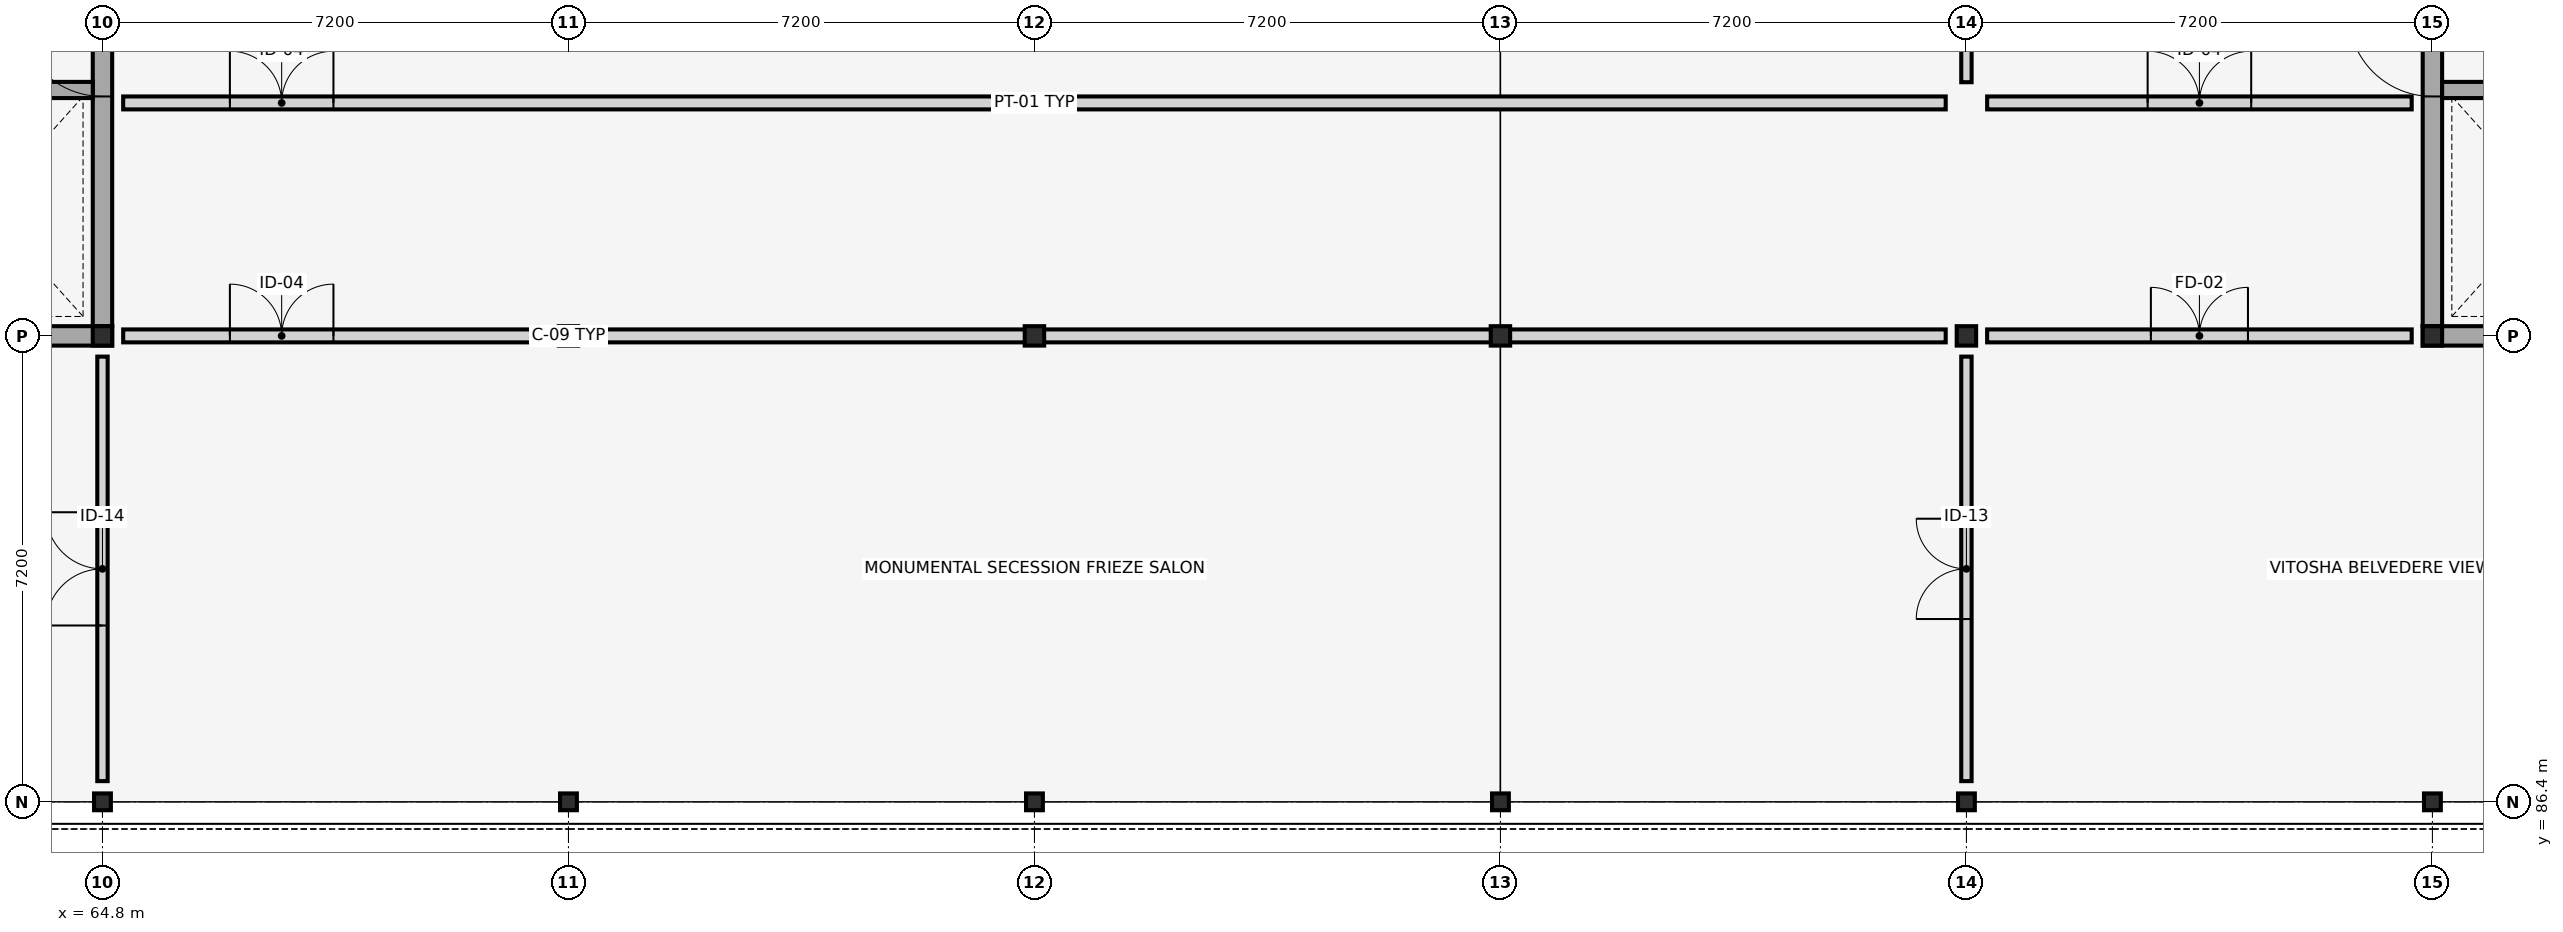
"""IFC4 building model, lengths in metres.
Left out: names, types, materials, properties, quantities, classifications, styles, units other than length and angle.
Written with IfcOpenShell. Run it as: python <this file> out.ifc"""

import sys

from ifc_helpers import new_model, si_unit, direction, frame, frame_2d, origin, origin_2d, place, context, subcontext, project, spatial, rectangle, i_section, extrude, element, fill, save


model = new_model("IFC4")
c1 = context("Model", 3, precision=1e-05, world=origin(), true_north=direction((0.0, 1.0)))
c2 = subcontext(c1, "Body", "Model", "MODEL_VIEW")
j1 = project(units=[si_unit("LENGTHUNIT", "METRE"), si_unit("PLANEANGLEUNIT", "RADIAN")], contexts=[c1])
p1 = place(None, origin())
s1 = spatial("IfcSite", under=j1, at=p1, CompositionType="ELEMENT")
p2 = place(p1, origin())
s2 = spatial("IfcBuilding", under=s1, at=p2, CompositionType="ELEMENT")
p3 = place(p2, frame((0.0, 0.0, 17.1)))
s3 = spatial("IfcBuildingStorey", under=s2, at=p3, CompositionType="ELEMENT", Elevation=17.1)
p4 = place(p3, frame((64.8, 86.4, 0.0), z_axis=(0.0, 0.0, 1.0), x_axis=(0.0, 1.0, 0.0)))
e1 = element("IfcColumn", 1, at=p4, inside=s3, PredefinedType="COLUMN", context=c2, shape_type="SweptSolid", body=[
    extrude(i_section(OverallWidth=0.26, OverallDepth=0.26, WebThickness=0.01, FlangeThickness=0.018, FilletRadius=0.024, at=origin_2d()), origin(), (0.0, 0.0, 1.0), 8.1),
])
p5 = place(p3, frame((64.8, 93.6, 0.0), z_axis=(0.0, 0.0, 1.0), x_axis=(1.0, 0.0, 0.0)))
e2 = element("IfcColumn", 2, at=p5, inside=s3, PredefinedType="COLUMN", context=c2, shape_type="SweptSolid", body=[
    extrude(i_section(OverallWidth=0.3, OverallDepth=0.3, WebThickness=0.011, FlangeThickness=0.019, FilletRadius=0.027, at=origin_2d()), origin(), (0.0, 0.0, 1.0), 8.1),
])
p6 = place(p3, frame((72.0, 86.4, 0.0), z_axis=(0.0, 0.0, 1.0), x_axis=(1.0, 0.0, 0.0)))
e3 = element("IfcColumn", 3, at=p6, inside=s3, PredefinedType="COLUMN", context=c2, shape_type="SweptSolid", body=[
    extrude(i_section(OverallWidth=0.26, OverallDepth=0.26, WebThickness=0.01, FlangeThickness=0.018, FilletRadius=0.024, at=origin_2d()), origin(), (0.0, 0.0, 1.0), 8.1),
])
p7 = place(p3, frame((72.0, 93.6, 0.0), z_axis=(0.0, 0.0, 1.0), x_axis=(0.0, 1.0, 0.0)))
e4 = element("IfcColumn", 4, at=p7, inside=s3, PredefinedType="COLUMN", context=c2, shape_type="SweptSolid", body=[
    extrude(i_section(OverallWidth=0.3, OverallDepth=0.3, WebThickness=0.011, FlangeThickness=0.019, FilletRadius=0.027, at=origin_2d()), origin(), (0.0, 0.0, 1.0), 8.1),
])
p8 = place(p3, frame((79.2, 86.4, 0.0), z_axis=(0.0, 0.0, 1.0), x_axis=(0.0, 1.0, 0.0)))
e5 = element("IfcColumn", 5, at=p8, inside=s3, PredefinedType="COLUMN", context=c2, shape_type="SweptSolid", body=[
    extrude(i_section(OverallWidth=0.26, OverallDepth=0.26, WebThickness=0.01, FlangeThickness=0.018, FilletRadius=0.024, at=origin_2d()), origin(), (0.0, 0.0, 1.0), 8.1),
])
p9 = place(p3, frame((79.2, 93.6, 0.0), z_axis=(0.0, 0.0, 1.0), x_axis=(1.0, 0.0, 0.0)))
e6 = element("IfcColumn", 6, at=p9, inside=s3, PredefinedType="COLUMN", context=c2, shape_type="SweptSolid", body=[
    extrude(i_section(OverallWidth=0.3, OverallDepth=0.3, WebThickness=0.011, FlangeThickness=0.019, FilletRadius=0.027, at=origin_2d()), origin(), (0.0, 0.0, 1.0), 8.1),
])
p10 = place(p3, frame((86.4, 86.4, 0.0), z_axis=(0.0, 0.0, 1.0), x_axis=(1.0, 0.0, 0.0)))
e7 = element("IfcColumn", 7, at=p10, inside=s3, PredefinedType="COLUMN", context=c2, shape_type="SweptSolid", body=[
    extrude(i_section(OverallWidth=0.26, OverallDepth=0.26, WebThickness=0.01, FlangeThickness=0.018, FilletRadius=0.024, at=origin_2d()), origin(), (0.0, 0.0, 1.0), 8.1),
])
p11 = place(p3, frame((86.4, 93.6, 0.0), z_axis=(0.0, 0.0, 1.0), x_axis=(0.0, 1.0, 0.0)))
e8 = element("IfcColumn", 8, at=p11, inside=s3, PredefinedType="COLUMN", context=c2, shape_type="SweptSolid", body=[
    extrude(i_section(OverallWidth=0.3, OverallDepth=0.3, WebThickness=0.011, FlangeThickness=0.019, FilletRadius=0.027, at=origin_2d()), origin(), (0.0, 0.0, 1.0), 8.1),
])
p12 = place(p3, frame((93.6, 86.4, 0.0), z_axis=(0.0, 0.0, 1.0), x_axis=(0.0, 1.0, 0.0)))
e9 = element("IfcColumn", 9, at=p12, inside=s3, PredefinedType="COLUMN", context=c2, shape_type="SweptSolid", body=[
    extrude(i_section(OverallWidth=0.26, OverallDepth=0.26, WebThickness=0.01, FlangeThickness=0.018, FilletRadius=0.024, at=origin_2d()), origin(), (0.0, 0.0, 1.0), 8.1),
])
p13 = place(p3, frame((93.6, 93.6, 0.0), z_axis=(0.0, 0.0, 1.0), x_axis=(1.0, 0.0, 0.0)))
e10 = element("IfcColumn", 10, at=p13, inside=s3, PredefinedType="COLUMN", context=c2, shape_type="SweptSolid", body=[
    extrude(i_section(OverallWidth=0.3, OverallDepth=0.3, WebThickness=0.011, FlangeThickness=0.019, FilletRadius=0.027, at=origin_2d()), origin(), (0.0, 0.0, 1.0), 8.1),
])
p14 = place(p3, frame((100.8, 86.4, 0.0), z_axis=(0.0, 0.0, 1.0), x_axis=(1.0, 0.0, 0.0)))
e11 = element("IfcColumn", 11, at=p14, inside=s3, PredefinedType="COLUMN", context=c2, shape_type="SweptSolid", body=[
    extrude(i_section(OverallWidth=0.26, OverallDepth=0.26, WebThickness=0.01, FlangeThickness=0.018, FilletRadius=0.024, at=origin_2d()), origin(), (0.0, 0.0, 1.0), 8.1),
])
p15 = place(p3, frame((100.8, 93.6, 0.0), z_axis=(0.0, 0.0, 1.0), x_axis=(0.0, 1.0, 0.0)))
e12 = element("IfcColumn", 12, at=p15, inside=s3, PredefinedType="COLUMN", context=c2, shape_type="SweptSolid", body=[
    extrude(i_section(OverallWidth=0.3, OverallDepth=0.3, WebThickness=0.011, FlangeThickness=0.019, FilletRadius=0.027, at=origin_2d()), origin(), (0.0, 0.0, 1.0), 8.1),
])
p16 = place(p3, frame((57.6, 93.6, 0.0), z_axis=(0.0, 0.0, 1.0), x_axis=(1.0, 0.0, 0.0)))
e13 = element("IfcWall", 13, at=p16, inside=s3, PredefinedType="SHEAR", context=c2, shape_type="SweptSolid", body=[
    extrude(rectangle(XDim=7.35, YDim=0.3, at=frame_2d((3.675, 0.0))), origin(), (0.0, 0.0, 1.0), 7.88),
])
p17 = place(p3, frame((64.8, 93.75, 0.0), z_axis=(0.0, 0.0, 1.0), x_axis=(0.0, 1.0, 0.0)))
e14 = element("IfcWall", 14, at=p17, inside=s3, PredefinedType="SHEAR", context=c2, shape_type="SweptSolid", body=[
    extrude(rectangle(XDim=14.1, YDim=0.3, at=frame_2d((7.05, 0.0))), origin(), (0.0, 0.0, 1.0), 7.88),
])
p18 = place(p17, frame((3.55, 0.0, 0.0)))
e15 = element("IfcOpeningElement", 15, at=p18, cuts=e14, PredefinedType="OPENING", context=c2, shape_type="SweptSolid", body=[
    extrude(rectangle(XDim=1.3, YDim=2.2, at=frame_2d((0.65, 1.1))), frame((0.0, 0.16, 0.0), z_axis=(0.0, -1.0, 0.0), x_axis=(1.0, 0.0, 0.0)), (0.0, 0.0, 1.0), 0.32),
])
p19 = place(p17, frame((7.85, 0.0, 0.0)))
e16 = element("IfcOpeningElement", 16, at=p19, cuts=e14, PredefinedType="OPENING", context=c2, shape_type="SweptSolid", body=[
    extrude(rectangle(XDim=1.05, YDim=2.15, at=frame_2d((0.525, 1.075))), frame((0.0, 0.16, 0.0), z_axis=(0.0, -1.0, 0.0), x_axis=(1.0, 0.0, 0.0)), (0.0, 0.0, 1.0), 0.32),
])
p20 = place(p17, frame((10.55, 0.0, 0.0)))
e17 = element("IfcOpeningElement", 17, at=p20, cuts=e14, PredefinedType="OPENING", context=c2, shape_type="SweptSolid", body=[
    extrude(rectangle(XDim=1.0, YDim=2.15, at=frame_2d((0.5, 1.075))), frame((0.0, 0.16, 0.0), z_axis=(0.0, -1.0, 0.0), x_axis=(1.0, 0.0, 0.0)), (0.0, 0.0, 1.0), 0.32),
])
p21 = place(p3, frame((61.275, 97.4, 0.0), z_axis=(0.0, 0.0, 1.0), x_axis=(1.0, 0.0, 0.0)))
e18 = element("IfcWall", 18, at=p21, inside=s3, PredefinedType="SHEAR", context=c2, shape_type="SweptSolid", body=[
    extrude(rectangle(XDim=3.375, YDim=0.25, at=frame_2d((1.688, 0.0))), origin(), (0.0, 0.0, 1.0), 7.88),
])
p22 = place(p3, frame((100.65, 93.6, 0.0), z_axis=(0.0, 0.0, 1.0), x_axis=(1.0, 0.0, 0.0)))
e19 = element("IfcWall", 19, at=p22, inside=s3, PredefinedType="SHEAR", context=c2, shape_type="SweptSolid", body=[
    extrude(rectangle(XDim=7.35, YDim=0.3, at=frame_2d((3.675, 0.0))), origin(), (0.0, 0.0, 1.0), 7.88),
])
p23 = place(p3, frame((100.8, 93.75, 0.0), z_axis=(0.0, 0.0, 1.0), x_axis=(0.0, 1.0, 0.0)))
e20 = element("IfcWall", 20, at=p23, inside=s3, PredefinedType="SHEAR", context=c2, shape_type="SweptSolid", body=[
    extrude(rectangle(XDim=14.1, YDim=0.3, at=frame_2d((7.05, 0.0))), origin(), (0.0, 0.0, 1.0), 7.88),
])
p24 = place(p23, frame((3.55, 0.0, 0.0)))
e21 = element("IfcOpeningElement", 21, at=p24, cuts=e20, PredefinedType="OPENING", context=c2, shape_type="SweptSolid", body=[
    extrude(rectangle(XDim=1.3, YDim=2.2, at=frame_2d((0.65, 1.1))), frame((0.0, 0.16, 0.0), z_axis=(0.0, -1.0, 0.0), x_axis=(1.0, 0.0, 0.0)), (0.0, 0.0, 1.0), 0.32),
])
p25 = place(p23, frame((7.85, 0.0, 0.0)))
e22 = element("IfcOpeningElement", 22, at=p25, cuts=e20, PredefinedType="OPENING", context=c2, shape_type="SweptSolid", body=[
    extrude(rectangle(XDim=1.05, YDim=2.15, at=frame_2d((0.525, 1.075))), frame((0.0, 0.16, 0.0), z_axis=(0.0, -1.0, 0.0), x_axis=(1.0, 0.0, 0.0)), (0.0, 0.0, 1.0), 0.32),
])
p26 = place(p23, frame((10.55, 0.0, 0.0)))
e23 = element("IfcOpeningElement", 23, at=p26, cuts=e20, PredefinedType="OPENING", context=c2, shape_type="SweptSolid", body=[
    extrude(rectangle(XDim=1.0, YDim=2.15, at=frame_2d((0.5, 1.075))), frame((0.0, 0.16, 0.0), z_axis=(0.0, -1.0, 0.0), x_axis=(1.0, 0.0, 0.0)), (0.0, 0.0, 1.0), 0.32),
])
p27 = place(p3, frame((100.95, 97.4, 0.0), z_axis=(0.0, 0.0, 1.0), x_axis=(1.0, 0.0, 0.0)))
e24 = element("IfcWall", 24, at=p27, inside=s3, PredefinedType="SHEAR", context=c2, shape_type="SweptSolid", body=[
    extrude(rectangle(XDim=3.375, YDim=0.25, at=frame_2d((1.688, 0.0))), origin(), (0.0, 0.0, 1.0), 7.88),
])
p28 = place(p3, frame((65.12, 97.2, 0.0), z_axis=(0.0, 0.0, 1.0), x_axis=(1.0, 0.0, 0.0)))
e25 = element("IfcWall", 25, at=p28, inside=s3, PredefinedType="PARTITIONING", context=c2, shape_type="SweptSolid", body=[
    extrude(rectangle(XDim=28.16, YDim=0.2, at=frame_2d((14.08, 0.0))), origin(), (0.0, 0.0, 1.0), 7.05),
])
p29 = place(p28, frame((1.649, 0.0, 0.0)))
e26 = element("IfcOpeningElement", 26, at=p29, cuts=e25, PredefinedType="OPENING", context=c2, shape_type="SweptSolid", body=[
    extrude(rectangle(XDim=1.6, YDim=2.35, at=frame_2d((0.8, 1.175))), frame((0.0, 0.11, 0.0), z_axis=(0.0, -1.0, 0.0), x_axis=(1.0, 0.0, 0.0)), (0.0, 0.0, 1.0), 0.22),
])
p30 = place(p3, frame((65.12, 93.6, 0.0), z_axis=(0.0, 0.0, 1.0), x_axis=(1.0, 0.0, 0.0)))
e27 = element("IfcWall", 27, at=p30, inside=s3, PredefinedType="PARTITIONING", context=c2, shape_type="SweptSolid", body=[
    extrude(rectangle(XDim=28.16, YDim=0.2, at=frame_2d((14.08, 0.0))), origin(), (0.0, 0.0, 1.0), 7.05),
])
p31 = place(p30, frame((1.649, 0.0, 0.0)))
e28 = element("IfcOpeningElement", 28, at=p31, cuts=e27, PredefinedType="OPENING", context=c2, shape_type="SweptSolid", body=[
    extrude(rectangle(XDim=1.6, YDim=2.35, at=frame_2d((0.8, 1.175))), frame((0.0, 0.11, 0.0), z_axis=(0.0, -1.0, 0.0), x_axis=(1.0, 0.0, 0.0)), (0.0, 0.0, 1.0), 0.22),
])
p32 = place(p3, frame((93.92, 93.6, 0.0), z_axis=(0.0, 0.0, 1.0), x_axis=(1.0, 0.0, 0.0)))
e29 = element("IfcWall", 29, at=p32, inside=s3, PredefinedType="PARTITIONING", context=c2, shape_type="SweptSolid", body=[
    extrude(rectangle(XDim=6.56, YDim=0.2, at=frame_2d((3.28, 0.0))), origin(), (0.0, 0.0, 1.0), 7.05),
])
p33 = place(p32, frame((2.53, 0.0, 0.0)))
e30 = element("IfcOpeningElement", 30, at=p33, cuts=e29, PredefinedType="OPENING", context=c2, shape_type="SweptSolid", body=[
    extrude(rectangle(XDim=1.5, YDim=2.25, at=frame_2d((0.75, 1.125))), frame((0.0, 0.11, 0.0), z_axis=(0.0, -1.0, 0.0), x_axis=(1.0, 0.0, 0.0)), (0.0, 0.0, 1.0), 0.22),
])
p34 = place(p3, frame((93.92, 97.2, 0.0), z_axis=(0.0, 0.0, 1.0), x_axis=(1.0, 0.0, 0.0)))
e31 = element("IfcWall", 31, at=p34, inside=s3, PredefinedType="PARTITIONING", context=c2, shape_type="SweptSolid", body=[
    extrude(rectangle(XDim=6.56, YDim=0.2, at=frame_2d((3.28, 0.0))), origin(), (0.0, 0.0, 1.0), 7.05),
])
p35 = place(p34, frame((2.48, 0.0, 0.0)))
e32 = element("IfcOpeningElement", 32, at=p35, cuts=e31, PredefinedType="OPENING", context=c2, shape_type="SweptSolid", body=[
    extrude(rectangle(XDim=1.6, YDim=2.35, at=frame_2d((0.8, 1.175))), frame((0.0, 0.11, 0.0), z_axis=(0.0, -1.0, 0.0), x_axis=(1.0, 0.0, 0.0)), (0.0, 0.0, 1.0), 0.22),
])
p36 = place(p3, frame((93.6, 97.52, 0.0), z_axis=(0.0, 0.0, 1.0), x_axis=(0.0, 1.0, 0.0)))
e33 = element("IfcWall", 33, at=p36, inside=s3, PredefinedType="PARTITIONING", context=c2, shape_type="SweptSolid", body=[
    extrude(rectangle(XDim=17.36, YDim=0.16, at=frame_2d((8.68, 0.0))), origin(), (0.0, 0.0, 1.0), 7.05),
])
p37 = place(p36, frame((8.055, 0.0, 0.0)))
e34 = element("IfcOpeningElement", 34, at=p37, cuts=e33, PredefinedType="OPENING", context=c2, shape_type="SweptSolid", body=[
    extrude(rectangle(XDim=1.25, YDim=2.3, at=frame_2d((0.625, 1.15))), frame((0.0, 0.09, 0.0), z_axis=(0.0, -1.0, 0.0), x_axis=(1.0, 0.0, 0.0)), (0.0, 0.0, 1.0), 0.18),
])
p38 = place(p3, frame((93.6, 86.72, 0.0), z_axis=(0.0, 0.0, 1.0), x_axis=(0.0, 1.0, 0.0)))
e35 = element("IfcWall", 35, at=p38, inside=s3, PredefinedType="PARTITIONING", context=c2, shape_type="SweptSolid", body=[
    extrude(rectangle(XDim=6.56, YDim=0.16, at=frame_2d((3.28, 0.0))), origin(), (0.0, 0.0, 1.0), 7.05),
])
p39 = place(p38, frame((2.505, 0.0, 0.0)))
e36 = element("IfcOpeningElement", 36, at=p39, cuts=e35, PredefinedType="OPENING", context=c2, shape_type="SweptSolid", body=[
    extrude(rectangle(XDim=1.55, YDim=2.4, at=frame_2d((0.775, 1.2))), frame((0.0, 0.09, 0.0), z_axis=(0.0, -1.0, 0.0), x_axis=(1.0, 0.0, 0.0)), (0.0, 0.0, 1.0), 0.18),
])
p40 = place(p3, frame((64.8, 86.72, 0.0), z_axis=(0.0, 0.0, 1.0), x_axis=(0.0, 1.0, 0.0)))
e37 = element("IfcWall", 37, at=p40, inside=s3, PredefinedType="PARTITIONING", context=c2, shape_type="SweptSolid", body=[
    extrude(rectangle(XDim=6.56, YDim=0.16, at=frame_2d((3.28, 0.0))), origin(), (0.0, 0.0, 1.0), 7.05),
])
p41 = place(p40, frame((2.405, 0.0, 0.0)))
e38 = element("IfcOpeningElement", 38, at=p41, cuts=e37, PredefinedType="OPENING", context=c2, shape_type="SweptSolid", body=[
    extrude(rectangle(XDim=1.75, YDim=2.45, at=frame_2d((0.875, 1.225))), frame((0.0, 0.09, 0.0), z_axis=(0.0, -1.0, 0.0), x_axis=(1.0, 0.0, 0.0)), (0.0, 0.0, 1.0), 0.18),
])
p42 = place(p18, origin())
e39 = element("IfcDoor", 39, at=p42, inside=s3, OperationType="SINGLE_SWING_RIGHT", PredefinedType="DOOR", context=c2, shape_type="SweptSolid", body=[
    extrude(rectangle(XDim=1.3, YDim=2.2, at=frame_2d((0.65, 1.1))), frame((0.0, 0.025, 0.0), z_axis=(0.0, -1.0, 0.0), x_axis=(1.0, 0.0, 0.0)), (0.0, 0.0, 1.0), 0.05),
])
fill(e15, e39)
p43 = place(p24, origin())
e40 = element("IfcDoor", 40, at=p43, inside=s3, OperationType="SINGLE_SWING_RIGHT", PredefinedType="DOOR", context=c2, shape_type="SweptSolid", body=[
    extrude(rectangle(XDim=1.3, YDim=2.2, at=frame_2d((0.65, 1.1))), frame((0.0, 0.025, 0.0), z_axis=(0.0, -1.0, 0.0), x_axis=(1.0, 0.0, 0.0)), (0.0, 0.0, 1.0), 0.05),
])
fill(e21, e40)
p44 = place(p29, origin())
e41 = element("IfcDoor", 41, at=p44, inside=s3, OperationType="DOUBLE_DOOR_SINGLE_SWING", PredefinedType="DOOR", context=c2, shape_type="SweptSolid", body=[
    extrude(rectangle(XDim=1.6, YDim=2.35, at=frame_2d((0.8, 1.175))), frame((0.0, 0.025, 0.0), z_axis=(0.0, -1.0, 0.0), x_axis=(1.0, 0.0, 0.0)), (0.0, 0.0, 1.0), 0.05),
])
fill(e26, e41)
p45 = place(p31, origin())
e42 = element("IfcDoor", 42, at=p45, inside=s3, OperationType="DOUBLE_DOOR_SINGLE_SWING", PredefinedType="DOOR", context=c2, shape_type="SweptSolid", body=[
    extrude(rectangle(XDim=1.6, YDim=2.35, at=frame_2d((0.8, 1.175))), frame((0.0, 0.025, 0.0), z_axis=(0.0, -1.0, 0.0), x_axis=(1.0, 0.0, 0.0)), (0.0, 0.0, 1.0), 0.05),
])
fill(e28, e42)
p46 = place(p33, origin())
e43 = element("IfcDoor", 43, at=p46, inside=s3, OperationType="DOUBLE_DOOR_SINGLE_SWING", PredefinedType="DOOR", context=c2, shape_type="SweptSolid", body=[
    extrude(rectangle(XDim=1.5, YDim=2.25, at=frame_2d((0.75, 1.125))), frame((0.0, 0.025, 0.0), z_axis=(0.0, -1.0, 0.0), x_axis=(1.0, 0.0, 0.0)), (0.0, 0.0, 1.0), 0.05),
])
fill(e30, e43)
p47 = place(p35, origin())
e44 = element("IfcDoor", 44, at=p47, inside=s3, OperationType="DOUBLE_DOOR_SINGLE_SWING", PredefinedType="DOOR", context=c2, shape_type="SweptSolid", body=[
    extrude(rectangle(XDim=1.6, YDim=2.35, at=frame_2d((0.8, 1.175))), frame((0.0, 0.025, 0.0), z_axis=(0.0, -1.0, 0.0), x_axis=(1.0, 0.0, 0.0)), (0.0, 0.0, 1.0), 0.05),
])
fill(e32, e44)
p48 = place(p39, origin())
e45 = element("IfcDoor", 45, at=p48, inside=s3, OperationType="DOUBLE_DOOR_SINGLE_SWING", PredefinedType="DOOR", context=c2, shape_type="SweptSolid", body=[
    extrude(rectangle(XDim=1.55, YDim=2.4, at=frame_2d((0.775, 1.2))), frame((0.0, 0.025, 0.0), z_axis=(0.0, -1.0, 0.0), x_axis=(1.0, 0.0, 0.0)), (0.0, 0.0, 1.0), 0.05),
])
fill(e36, e45)
p49 = place(p41, origin())
e46 = element("IfcDoor", 46, at=p49, inside=s3, OperationType="DOUBLE_DOOR_SINGLE_SWING", PredefinedType="DOOR", context=c2, shape_type="SweptSolid", body=[
    extrude(rectangle(XDim=1.75, YDim=2.45, at=frame_2d((0.875, 1.225))), frame((0.0, 0.025, 0.0), z_axis=(0.0, -1.0, 0.0), x_axis=(1.0, 0.0, 0.0)), (0.0, 0.0, 1.0), 0.05),
])
fill(e38, e46)
save(model, sys.argv[1])
